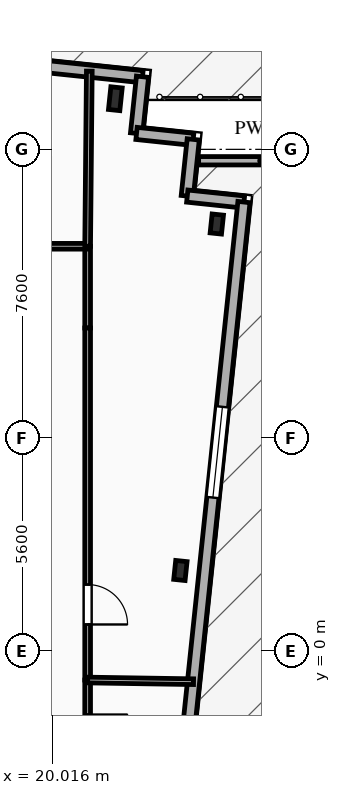
"""IFC4 building model, lengths in metres.
Left out: names, types, materials, properties, quantities, classifications, styles, units other than length and angle.
Written with IfcOpenShell. Run it as: python <this file> out.ifc"""

import sys

from ifc_helpers import new_model, si_unit, direction, frame, frame_2d, origin, origin_2d, place, context, subcontext, project, spatial, rectangle, i_section, extrude, element, fill, save


model = new_model("IFC4")
c1 = context("Model", 3, precision=1e-05, world=origin(), true_north=direction((0.0, 1.0)))
c2 = subcontext(c1, "Body", "Model", "MODEL_VIEW")
j1 = project(units=[si_unit("LENGTHUNIT", "METRE"), si_unit("PLANEANGLEUNIT", "RADIAN")], contexts=[c1])
p1 = place(None, origin())
s1 = spatial("IfcSite", under=j1, at=p1, CompositionType="ELEMENT")
p2 = place(p1, origin())
s2 = spatial("IfcBuilding", under=s1, at=p2, CompositionType="ELEMENT")
p3 = place(p2, frame((0.0, 0.0, 179.65)))
s3 = spatial("IfcBuildingStorey", under=s2, at=p3, CompositionType="ELEMENT", Elevation=179.65)
p4 = place(p3, frame((21.679, 14.532, 0.0), z_axis=(0.0, 0.0, 1.0), x_axis=(0.994521895368, -0.104528463268, 0.0)))
e1 = element("IfcColumn", 1, at=p4, inside=s3, PredefinedType="COLUMN", context=c2, shape_type="SweptSolid", body=[
    extrude(i_section(OverallWidth=0.3, OverallDepth=0.6, WebThickness=0.015, FlangeThickness=0.03, FilletRadius=0.027, at=origin_2d()), origin(), (0.0, 0.0, 1.0), 3.35),
])
for number, where, z_axis, x_axis in (
    (2, (23.391, 2.119, 0.0), (0.0, 0.0, 1.0), (0.995, -0.105, 0.0)),
    (3, (24.349, 11.235, 0.0), (0.0, 0.0, 1.0), (0.995, -0.105, 0.0)),
):
    element("IfcColumn", number, at=place(p3, frame(where, z_axis=z_axis, x_axis=x_axis)), inside=s3, PredefinedType="COLUMN", context=c2, shape_type="SweptSolid", body=[
        extrude(i_section(OverallWidth=0.3, OverallDepth=0.5, WebThickness=0.014, FlangeThickness=0.028, FilletRadius=0.027, at=origin_2d()), origin(), (0.0, 0.0, 1.0), 3.35),
    ])
p5 = place(p3, frame((-23.156, 19.898, 0.0), z_axis=(0.0, 0.0, 1.0), x_axis=(0.994522001802, -0.104527450613, 0.0)))
e4 = element("IfcWall", 4, at=p5, inside=s3, PredefinedType="SOLIDWALL", context=c2, shape_type="SweptSolid", body=[
    extrude(rectangle(XDim=45.8, YDim=0.32, at=frame_2d((22.9, 0.0))), origin(), (0.0, 0.0, 1.0), 3.04),
])
p6 = place(p5, frame((10.65, 0.0, 0.0)))
e5 = element("IfcOpeningElement", 5, at=p6, cuts=e4, PredefinedType="OPENING", context=c2, shape_type="SweptSolid", body=[
    extrude(rectangle(XDim=1.2, YDim=2.2, at=frame_2d((0.6, 1.1))), frame((0.0, 0.17, 0.0), z_axis=(0.0, -1.0, 0.0), x_axis=(1.0, 0.0, 0.0)), (0.0, 0.0, 1.0), 0.34),
])
p7 = place(p5, frame((5.34, 0.0, 0.85)))
e6 = element("IfcOpeningElement", 6, at=p7, cuts=e4, PredefinedType="OPENING", context=c2, shape_type="SweptSolid", body=[
    extrude(rectangle(XDim=1.65, YDim=1.85, at=frame_2d((0.825, 0.925))), frame((0.0, 0.17, 0.0), z_axis=(0.0, -1.0, 0.0), x_axis=(1.0, 0.0, 0.0)), (0.0, 0.0, 1.0), 0.34),
])
p8 = place(p5, frame((12.842, 0.0, 0.85)))
e7 = element("IfcOpeningElement", 7, at=p8, cuts=e4, PredefinedType="OPENING", context=c2, shape_type="SweptSolid", body=[
    extrude(rectangle(XDim=2.4, YDim=1.95, at=frame_2d((1.2, 0.975))), frame((0.0, 0.17, 0.0), z_axis=(0.0, -1.0, 0.0), x_axis=(1.0, 0.0, 0.0)), (0.0, 0.0, 1.0), 0.34),
])
p9 = place(p5, frame((19.398, 0.0, 0.85)))
e8 = element("IfcOpeningElement", 8, at=p9, cuts=e4, PredefinedType="OPENING", context=c2, shape_type="SweptSolid", body=[
    extrude(rectangle(XDim=2.2, YDim=1.85, at=frame_2d((1.1, 0.925))), frame((0.0, 0.17, 0.0), z_axis=(0.0, -1.0, 0.0), x_axis=(1.0, 0.0, 0.0)), (0.0, 0.0, 1.0), 0.34),
])
p10 = place(p5, frame((26.344, 0.0, 0.85)))
e9 = element("IfcOpeningElement", 9, at=p10, cuts=e4, PredefinedType="OPENING", context=c2, shape_type="SweptSolid", body=[
    extrude(rectangle(XDim=2.4, YDim=1.95, at=frame_2d((1.2, 0.975))), frame((0.0, 0.17, 0.0), z_axis=(0.0, -1.0, 0.0), x_axis=(1.0, 0.0, 0.0)), (0.0, 0.0, 1.0), 0.34),
])
p11 = place(p5, frame((33.49, 0.0, 0.85)))
e10 = element("IfcOpeningElement", 10, at=p11, cuts=e4, PredefinedType="OPENING", context=c2, shape_type="SweptSolid", body=[
    extrude(rectangle(XDim=2.2, YDim=1.85, at=frame_2d((1.1, 0.925))), frame((0.0, 0.17, 0.0), z_axis=(0.0, -1.0, 0.0), x_axis=(1.0, 0.0, 0.0)), (0.0, 0.0, 1.0), 0.34),
])
p12 = place(p5, frame((40.451, 0.0, 0.85)))
e11 = element("IfcOpeningElement", 11, at=p12, cuts=e4, PredefinedType="OPENING", context=c2, shape_type="SweptSolid", body=[
    extrude(rectangle(XDim=1.65, YDim=1.85, at=frame_2d((0.825, 0.925))), frame((0.0, 0.17, 0.0), z_axis=(0.0, -1.0, 0.0), x_axis=(1.0, 0.0, 0.0)), (0.0, 0.0, 1.0), 0.34),
])
p13 = place(p3, frame((22.393, 15.111, 0.0), z_axis=(0.0, 0.0, 1.0), x_axis=(-0.104481464157, -0.994526834051, 0.0)))
e12 = element("IfcWall", 12, at=p13, inside=s3, PredefinedType="SOLIDWALL", context=c2, shape_type="SweptSolid", body=[
    extrude(rectangle(XDim=1.5, YDim=0.32, at=frame_2d((0.75, 0.0))), origin(), (0.0, 0.0, 1.0), 3.04),
])
for number, where, z_axis, x_axis in (
    (13, (22.237, 13.619, 0.0), (0.0, 0.0, 1.0), (0.995, -0.104, 0.0)),
    (14, (23.728, 13.462, 0.0), (0.0, 0.0, 1.0), (-0.104, -0.995, 0.0)),
    (15, (23.572, 11.971, 0.0), (0.0, 0.0, 1.0), (0.995, -0.105, 0.0)),
):
    element("IfcWall", number, at=place(p3, frame(where, z_axis=z_axis, x_axis=x_axis)), inside=s3, PredefinedType="SOLIDWALL", context=c2, shape_type="SweptSolid", body=[
        extrude(rectangle(XDim=1.5, YDim=0.32, at=frame_2d((0.75, 0.0))), origin(), (0.0, 0.0, 1.0), 3.04),
    ])
p14 = place(p3, frame((25.063, 11.814, 0.0), z_axis=(0.0, 0.0, 1.0), x_axis=(-0.104523275986, -0.99452244056, 0.0)))
e16 = element("IfcWall", 16, at=p14, inside=s3, PredefinedType="SOLIDWALL", context=c2, shape_type="SweptSolid", body=[
    extrude(rectangle(XDim=28.8, YDim=0.32, at=frame_2d((14.4, 0.0))), origin(), (0.0, 0.0, 1.0), 3.04),
])
p15 = place(p14, frame((5.418, 0.0, 0.85)))
e17 = element("IfcOpeningElement", 17, at=p15, cuts=e16, PredefinedType="OPENING", context=c2, shape_type="SweptSolid", body=[
    extrude(rectangle(XDim=2.4, YDim=1.95, at=frame_2d((1.2, 0.975))), frame((0.0, 0.17, 0.0), z_axis=(0.0, -1.0, 0.0), x_axis=(1.0, 0.0, 0.0)), (0.0, 0.0, 1.0), 0.34),
])
p16 = place(p14, frame((19.377, 0.0, 0.85)))
e18 = element("IfcOpeningElement", 18, at=p16, cuts=e16, PredefinedType="OPENING", context=c2, shape_type="SweptSolid", body=[
    extrude(rectangle(XDim=2.4, YDim=1.95, at=frame_2d((1.2, 0.975))), frame((0.0, 0.17, 0.0), z_axis=(0.0, -1.0, 0.0), x_axis=(1.0, 0.0, 0.0)), (0.0, 0.0, 1.0), 0.34),
])
p17 = place(p3, frame((27.2, 12.9, 0.0), z_axis=(0.0, 0.0, 1.0), x_axis=(-1.0, 0.0, 0.0)))
e19 = element("IfcWall", 19, at=p17, inside=s3, PredefinedType="PARAPET", context=c2, shape_type="SweptSolid", body=[
    extrude(rectangle(XDim=3.33, YDim=0.22, at=frame_2d((1.665, 0.0))), origin(), (0.0, 0.0, 1.0), 0.65),
])
p18 = place(p3, frame((20.95, 10.65, 0.0), z_axis=(0.0, 0.0, 1.0), x_axis=(0.0, -1.0, 0.0)))
e20 = element("IfcWall", 20, at=p18, inside=s3, PredefinedType="PARTITIONING", context=c2, shape_type="SweptSolid", body=[
    extrude(rectangle(XDim=2.15, YDim=0.15, at=frame_2d((1.075, 0.0))), origin(), (0.0, 0.0, 1.0), 3.04),
])
p19 = place(p3, frame((14.617, 10.65, 0.0), z_axis=(0.0, 0.0, 1.0), x_axis=(1.0, 0.0, 0.0)))
e21 = element("IfcWall", 21, at=p19, inside=s3, PredefinedType="PARTITIONING", context=c2, shape_type="SweptSolid", body=[
    extrude(rectangle(XDim=6.333, YDim=0.15, at=frame_2d((3.167, 0.0))), origin(), (0.0, 0.0, 1.0), 3.04),
])
p20 = place(p19, frame((1.611, 0.0, 0.0)))
e22 = element("IfcOpeningElement", 22, at=p20, cuts=e21, PredefinedType="OPENING", context=c2, shape_type="SweptSolid", body=[
    extrude(rectangle(XDim=1.05, YDim=2.15, at=frame_2d((0.525, 1.075))), frame((0.0, 0.085, 0.0), z_axis=(0.0, -1.0, 0.0), x_axis=(1.0, 0.0, 0.0)), (0.0, 0.0, 1.0), 0.17),
])
p21 = place(p3, frame((20.95, -0.763, 0.0), z_axis=(0.0, 0.0, 1.0), x_axis=(0.0, -1.0, 0.0)))
e23 = element("IfcWall", 23, at=p21, inside=s3, PredefinedType="PARTITIONING", context=c2, shape_type="SweptSolid", body=[
    extrude(rectangle(XDim=4.837, YDim=0.15, at=frame_2d((2.418, 0.0))), origin(), (0.0, 0.0, 1.0), 2.695),
])
p22 = place(p21, frame((0.908, 0.0, 0.0)))
e24 = element("IfcOpeningElement", 24, at=p22, cuts=e23, PredefinedType="OPENING", context=c2, shape_type="SweptSolid", body=[
    extrude(rectangle(XDim=1.05, YDim=2.15, at=frame_2d((0.525, 1.075))), frame((0.0, 0.085, 0.0), z_axis=(0.0, -1.0, 0.0), x_axis=(1.0, 0.0, 0.0)), (0.0, 0.0, 1.0), 0.17),
])
p23 = place(p3, frame((20.95, 8.5, 0.0), z_axis=(0.0, 0.0, 1.0), x_axis=(0.0, -1.0, 0.0)))
e25 = element("IfcWall", 25, at=p23, inside=s3, PredefinedType="PARTITIONING", context=c2, shape_type="SweptSolid", body=[
    extrude(rectangle(XDim=9.263, YDim=0.15, at=frame_2d((4.632, 0.0))), origin(), (0.0, 0.0, 1.0), 2.695),
])
p24 = place(p23, frame((6.751, 0.0, 0.0)))
e26 = element("IfcOpeningElement", 26, at=p24, cuts=e25, PredefinedType="OPENING", context=c2, shape_type="SweptSolid", body=[
    extrude(rectangle(XDim=1.05, YDim=2.15, at=frame_2d((0.525, 1.075))), frame((0.0, 0.085, 0.0), z_axis=(0.0, -1.0, 0.0), x_axis=(1.0, 0.0, 0.0)), (0.0, 0.0, 1.0), 0.17),
])
p25 = place(p3, frame((20.95, -0.763, 0.0), z_axis=(0.0, 0.0, 1.0), x_axis=(0.999875696831, -0.015766765259, 0.0)))
e27 = element("IfcWall", 27, at=p25, inside=s3, PredefinedType="PARTITIONING", context=c2, shape_type="SweptSolid", body=[
    extrude(rectangle(XDim=2.787, YDim=0.15, at=frame_2d((1.394, 0.0))), origin(), (0.0, 0.0, 1.0), 3.04),
])
p26 = place(p3, frame((20.95, 10.65, 0.0), z_axis=(0.0, 0.0, 1.0), x_axis=(0.009535990233, 0.999954531411, 0.0)))
e28 = element("IfcWall", 28, at=p26, inside=s3, PredefinedType="PARTITIONING", context=c2, shape_type="SweptSolid", body=[
    extrude(rectangle(XDim=4.608, YDim=0.15, at=frame_2d((2.304, 0.0))), origin(), (0.0, 0.0, 1.0), 2.665),
])
p27 = place(p15, origin())
e29 = element("IfcWindow", 29, at=p27, inside=s3, PartitioningType="SINGLE_PANEL", PredefinedType="WINDOW", context=c2, shape_type="SweptSolid", body=[
    extrude(rectangle(XDim=2.4, YDim=1.95, at=frame_2d((1.2, 0.975))), frame((0.0, 0.03, 0.0), z_axis=(0.0, -1.0, 0.0), x_axis=(1.0, 0.0, 0.0)), (0.0, 0.0, 1.0), 0.06),
])
fill(e17, e29)
p28 = place(p22, origin())
e30 = element("IfcDoor", 30, at=p28, inside=s3, OperationType="SINGLE_SWING_LEFT", PredefinedType="DOOR", context=c2, shape_type="SweptSolid", body=[
    extrude(rectangle(XDim=1.05, YDim=2.15, at=frame_2d((0.525, 1.075))), frame((0.0, 0.025, 0.0), z_axis=(0.0, -1.0, 0.0), x_axis=(1.0, 0.0, 0.0)), (0.0, 0.0, 1.0), 0.05),
])
fill(e24, e30)
p29 = place(p24, origin())
e31 = element("IfcDoor", 31, at=p29, inside=s3, OperationType="SINGLE_SWING_RIGHT", PredefinedType="DOOR", context=c2, shape_type="SweptSolid", body=[
    extrude(rectangle(XDim=1.05, YDim=2.15, at=frame_2d((0.525, 1.075))), frame((0.0, 0.025, 0.0), z_axis=(0.0, -1.0, 0.0), x_axis=(1.0, 0.0, 0.0)), (0.0, 0.0, 1.0), 0.05),
])
fill(e26, e31)
save(model, sys.argv[1])
